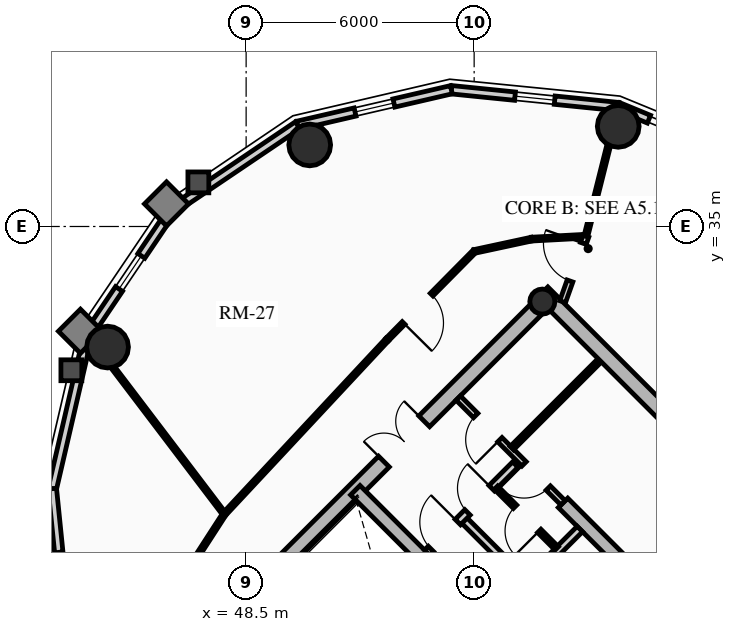
"""IFC4 building model, lengths in metres.
Left out: names, types, materials, properties, quantities, classifications, styles, units other than length and angle.
Written with IfcOpenShell. Run it as: python <this file> out.ifc"""

import sys

from ifc_helpers import new_model, si_unit, direction, frame, frame_2d, origin, origin_2d, place, context, subcontext, project, spatial, rectangle, circle, hollow_circle, extrude, source, transform, mapped, element, fill, save


model = new_model("IFC4")
c1 = context("Model", 3, precision=1e-05, world=origin(), true_north=direction((0.0, 1.0)))
c2 = subcontext(c1, "Body", "Model", "MODEL_VIEW")
j1 = project(units=[si_unit("LENGTHUNIT", "METRE"), si_unit("PLANEANGLEUNIT", "RADIAN")], contexts=[c1])
p1 = place(None, origin())
s1 = spatial("IfcSite", under=j1, at=p1, CompositionType="ELEMENT")
p2 = place(p1, origin())
s2 = spatial("IfcBuilding", under=s1, at=p2, CompositionType="ELEMENT")
p3 = place(p2, frame((0.0, 0.0, 202.48)))
s3 = spatial("IfcBuildingStorey", under=s2, at=p3, CompositionType="ELEMENT", Elevation=202.48)
p4 = place(p3, frame((66.268, 23.298, 0.0), z_axis=(0.0, 0.0, 1.0), x_axis=(-0.707106781187, 0.707106781187, 0.0)))
e1 = element("IfcWall", 1, at=p4, inside=s3, PredefinedType="SHEAR", context=c2, shape_type="SweptSolid", body=[
    extrude(rectangle(XDim=14.1, YDim=0.4, at=frame_2d((7.05, 0.0))), origin(), (0.0, 0.0, 1.0), 2.91),
])
p5 = place(p3, frame((48.873, 25.561, 0.0), z_axis=(0.0, 0.0, 1.0), x_axis=(0.707106781187, 0.707106781187, 0.0)))
e2 = element("IfcWall", 2, at=p5, inside=s3, PredefinedType="SHEAR", context=c2, shape_type="SweptSolid", body=[
    extrude(rectangle(XDim=10.7, YDim=0.4, at=frame_2d((5.35, 0.0))), origin(), (0.0, 0.0, 1.0), 2.91),
])
m1 = source(origin(), c2, "Body", "SweptSolid", [
    extrude(rectangle(XDim=1.5, YDim=2.02, at=frame_2d((0.75, 1.01))), frame((0.0, 0.21, 0.0), z_axis=(0.0, -1.0, 0.0), x_axis=(1.0, 0.0, 0.0)), (0.0, 0.0, 1.0), 0.42),
])
p6 = place(p5, frame((4.6, 0.0, 0.0)))
e3 = element("IfcOpeningElement", 3, at=p6, cuts=e2, PredefinedType="OPENING", context=c2, shape_type="MappedRepresentation", body=[
    mapped(m1, transform((0.0, 0.0, 0.0), x_axis=(1.0, 0.0, 0.0), y_axis=(0.0, 1.0, 0.0), z_axis=(0.0, 0.0, 1.0), scale=1.0)),
])
p7 = place(p3, frame((61.06, 18.373, 0.0), z_axis=(0.0, 0.0, 1.0), x_axis=(-0.707106781187, 0.707106781187, 0.0)))
e4 = element("IfcWall", 4, at=p7, inside=s3, PredefinedType="SHEAR", context=c2, shape_type="SweptSolid", body=[
    extrude(rectangle(XDim=13.7, YDim=0.35, at=frame_2d((6.85, 0.0))), origin(), (0.0, 0.0, 1.0), 2.91),
])
m2 = source(origin(), c2, "Body", "SweptSolid", [
    extrude(rectangle(XDim=1.1, YDim=2.015, at=frame_2d((0.55, 1.007))), frame((0.0, 0.185, 0.0), z_axis=(0.0, -1.0, 0.0), x_axis=(1.0, 0.0, 0.0)), (0.0, 0.0, 1.0), 0.37),
])
p8 = place(p7, frame((4.85, 0.0, 0.0)))
e5 = element("IfcOpeningElement", 5, at=p8, cuts=e4, PredefinedType="OPENING", context=c2, shape_type="MappedRepresentation", body=[
    mapped(m2, transform((0.0, 0.0, 0.0), x_axis=(1.0, 0.0, 0.0), y_axis=(0.0, 1.0, 0.0), z_axis=(0.0, 0.0, 1.0), scale=1.0)),
])
p9 = place(p7, frame((0.625, 0.0, 0.0)))
e6 = element("IfcOpeningElement", 6, at=p9, cuts=e4, PredefinedType="OPENING", context=c2, shape_type="MappedRepresentation", body=[
    mapped(m2, transform((0.0, 0.0, 0.0), x_axis=(1.0, 0.0, 0.0), y_axis=(0.0, 1.0, 0.0), z_axis=(0.0, 0.0, 1.0), scale=1.0)),
])
p10 = place(p7, frame((2.625, 0.0, 0.0)))
e7 = element("IfcOpeningElement", 7, at=p10, cuts=e4, PredefinedType="OPENING", context=c2, shape_type="MappedRepresentation", body=[
    mapped(m2, transform((0.0, 0.0, 0.0), x_axis=(1.0, 0.0, 0.0), y_axis=(0.0, 1.0, 0.0), z_axis=(0.0, 0.0, 1.0), scale=1.0)),
])
m3 = source(origin(), c2, "Body", "SweptSolid", [
    extrude(rectangle(XDim=1.15, YDim=2.02, at=frame_2d((0.575, 1.01))), frame((0.0, 0.185, 0.0), z_axis=(0.0, -1.0, 0.0), x_axis=(1.0, 0.0, 0.0)), (0.0, 0.0, 1.0), 0.37),
])
p11 = place(p7, frame((7.27, 0.0, 0.0)))
e8 = element("IfcOpeningElement", 8, at=p11, cuts=e4, PredefinedType="OPENING", context=c2, shape_type="MappedRepresentation", body=[
    mapped(m3, transform((0.0, 0.0, 0.0), x_axis=(1.0, 0.0, 0.0), y_axis=(0.0, 1.0, 0.0), z_axis=(0.0, 0.0, 1.0), scale=1.0)),
])
p12 = place(p3, frame((63.627, 20.94, 0.0), z_axis=(0.0, 0.0, 1.0), x_axis=(-0.707119496762, 0.707094065383, 0.0)))
e9 = element("IfcWall", 9, at=p12, inside=s3, PredefinedType="SHEAR", context=c2, shape_type="SweptSolid", body=[
    extrude(rectangle(XDim=9.6, YDim=0.35, at=frame_2d((4.8, 0.0))), origin(), (0.0, 0.0, 1.0), 2.91),
])
p13 = place(p12, frame((5.28, 0.0, 0.0)))
e10 = element("IfcOpeningElement", 10, at=p13, cuts=e9, PredefinedType="OPENING", context=c2, shape_type="MappedRepresentation", body=[
    mapped(m3, transform((0.0, 0.0, 0.0), x_axis=(1.0, 0.0, 0.0), y_axis=(0.0, 1.0, 0.0), z_axis=(0.0, 0.0, 1.0), scale=1.0)),
])
p14 = place(p3, frame((58.893, 25.674, 0.0), z_axis=(0.0, 0.0, 1.0), x_axis=(0.707106781187, 0.707106781187, 0.0)))
e11 = element("IfcWall", 11, at=p14, inside=s3, PredefinedType="SHEAR", context=c2, shape_type="SweptSolid", body=[
    extrude(rectangle(XDim=3.285, YDim=0.35, at=frame_2d((1.643, 0.0))), origin(), (0.0, 0.0, 1.0), 2.91),
])
p15 = place(p3, frame((56.294, 33.024, 0.0), z_axis=(0.0, 0.0, 1.0), x_axis=(0.707106781187, 0.707106781187, 0.0)))
e12 = element("IfcColumn", 12, at=p15, inside=s3, PredefinedType="COLUMN", context=c2, shape_type="SweptSolid", body=[
    extrude(hollow_circle(Radius=0.33, WallThickness=0.025, at=origin_2d()), origin(), (0.0, 0.0, 1.0), 2.91),
])
for number, where, z_axis, x_axis in (
    (13, (58.291, 37.635, 0.0), (0.0, 0.0, 1.0), (1.0, 0.0, 0.0)),
    (14, (50.173, 37.146, 0.0), (0.0, 0.0, 1.0), (1.0, 0.0, 0.0)),
    (15, (44.854, 31.827, 0.0), (0.0, 0.0, 1.0), (1.0, 0.0, 0.0)),
):
    element("IfcColumn", number, at=place(p3, frame(where, z_axis=z_axis, x_axis=x_axis)), inside=s3, PredefinedType="USERDEFINED", context=c2, shape_type="SweptSolid", body=[
        extrude(circle(Radius=0.55, at=origin_2d()), origin(), (0.0, 0.0, 1.0), 2.91),
    ])
p16 = place(p3, frame((58.295, 38.155, 0.0), z_axis=(0.0, 0.0, 1.0), x_axis=(0.924515260676, -0.381145028536, 0.0)))
e16 = element("IfcWall", 16, at=p16, inside=s3, PredefinedType="SOLIDWALL", context=c2, shape_type="SweptSolid", body=[
    extrude(rectangle(XDim=0.87, YDim=0.22, at=frame_2d((0.435, 0.0))), origin(), (0.0, 0.0, 1.0), 2.322),
])
p17 = place(p3, frame((53.9, 38.599, 0.0), z_axis=(0.0, 0.0, 1.0), x_axis=(0.994929930991, -0.100570534541, 0.0)))
e17 = element("IfcWall", 17, at=p17, inside=s3, PredefinedType="SOLIDWALL", context=c2, shape_type="SweptSolid", body=[
    extrude(rectangle(XDim=4.418, YDim=0.22, at=frame_2d((2.209, 0.0))), origin(), (0.0, 0.0, 1.0), 2.322),
])
m4 = source(origin(), c2, "Body", "SweptSolid", [
    extrude(rectangle(XDim=1.05, YDim=1.3, at=frame_2d((0.525, 0.65))), frame((0.0, 0.12, 0.0), z_axis=(0.0, -1.0, 0.0), x_axis=(1.0, 0.0, 0.0)), (0.0, 0.0, 1.0), 0.24),
])
p18 = place(p17, frame((1.684, 0.0, 0.65)))
e18 = element("IfcOpeningElement", 18, at=p18, cuts=e17, PredefinedType="OPENING", context=c2, shape_type="MappedRepresentation", body=[
    mapped(m4, transform((0.0, 0.0, 0.0), x_axis=(1.0, 0.0, 0.0), y_axis=(0.0, 1.0, 0.0), z_axis=(0.0, 0.0, 1.0), scale=1.0)),
])
p19 = place(p3, frame((49.856, 37.663, 0.0), z_axis=(0.0, 0.0, 1.0), x_axis=(0.974249228678, 0.225473813158, 0.0)))
e19 = element("IfcWall", 19, at=p19, inside=s3, PredefinedType="SOLIDWALL", context=c2, shape_type="SweptSolid", body=[
    extrude(rectangle(XDim=4.15, YDim=0.22, at=frame_2d((2.075, 0.0))), origin(), (0.0, 0.0, 1.0), 2.322),
])
p20 = place(p19, frame((1.55, 0.0, 0.65)))
e20 = element("IfcOpeningElement", 20, at=p20, cuts=e19, PredefinedType="OPENING", context=c2, shape_type="MappedRepresentation", body=[
    mapped(m4, transform((0.0, 0.0, 0.0), x_axis=(1.0, 0.0, 0.0), y_axis=(0.0, 1.0, 0.0), z_axis=(0.0, 0.0, 1.0), scale=1.0)),
])
p21 = place(p3, frame((46.561, 35.439, 0.0), z_axis=(0.0, 0.0, 1.0), x_axis=(0.828833723692, 0.559495003079, 0.0)))
e21 = element("IfcWall", 21, at=p21, inside=s3, PredefinedType="SOLIDWALL", context=c2, shape_type="SweptSolid", body=[
    extrude(rectangle(XDim=3.976, YDim=0.22, at=frame_2d((1.988, 0.0))), origin(), (0.0, 0.0, 1.0), 2.322),
])
p22 = place(p3, frame((44.337, 32.144, 0.0), z_axis=(0.0, 0.0, 1.0), x_axis=(0.559495003079, 0.828833723692, 0.0)))
e22 = element("IfcWall", 22, at=p22, inside=s3, PredefinedType="SOLIDWALL", context=c2, shape_type="SweptSolid", body=[
    extrude(rectangle(XDim=3.976, YDim=0.22, at=frame_2d((1.988, 0.0))), origin(), (0.0, 0.0, 1.0), 2.322),
])
p23 = place(p22, frame((1.463, 0.0, 0.65)))
e23 = element("IfcOpeningElement", 23, at=p23, cuts=e22, PredefinedType="OPENING", context=c2, shape_type="MappedRepresentation", body=[
    mapped(m4, transform((0.0, 0.0, 0.0), x_axis=(1.0, 0.0, 0.0), y_axis=(0.0, 1.0, 0.0), z_axis=(0.0, 0.0, 1.0), scale=1.0)),
])
p24 = place(p3, frame((43.401, 28.1, 0.0), z_axis=(0.0, 0.0, 1.0), x_axis=(0.225473813158, 0.974249228678, 0.0)))
e24 = element("IfcWall", 24, at=p24, inside=s3, PredefinedType="SOLIDWALL", context=c2, shape_type="SweptSolid", body=[
    extrude(rectangle(XDim=4.15, YDim=0.22, at=frame_2d((2.075, 0.0))), origin(), (0.0, 0.0, 1.0), 2.322),
])
p25 = place(p3, frame((43.845, 23.705, 0.0), z_axis=(0.0, 0.0, 1.0), x_axis=(-0.100570534541, 0.994929930991, 0.0)))
e25 = element("IfcWall", 25, at=p25, inside=s3, PredefinedType="SOLIDWALL", context=c2, shape_type="SweptSolid", body=[
    extrude(rectangle(XDim=4.418, YDim=0.22, at=frame_2d((2.209, 0.0))), origin(), (0.0, 0.0, 1.0), 2.322),
])
p26 = place(p25, frame((1.684, 0.0, 0.65)))
e26 = element("IfcOpeningElement", 26, at=p26, cuts=e25, PredefinedType="OPENING", context=c2, shape_type="MappedRepresentation", body=[
    mapped(m4, transform((0.0, 0.0, 0.0), x_axis=(1.0, 0.0, 0.0), y_axis=(0.0, 1.0, 0.0), z_axis=(0.0, 0.0, 1.0), scale=1.0)),
])
p27 = place(p3, frame((54.961, 24.719, 0.0), z_axis=(0.0, 0.0, 1.0), x_axis=(0.707106781187, 0.707106781187, 0.0)))
e27 = element("IfcWall", 27, at=p27, inside=s3, PredefinedType="PARTITIONING", context=c2, shape_type="SweptSolid", body=[
    extrude(rectangle(XDim=3.28, YDim=0.2, at=frame_2d((1.64, 0.0))), origin(), (0.0, 0.0, 1.0), 2.685),
])
m5 = source(origin(), c2, "Body", "SweptSolid", [
    extrude(rectangle(XDim=0.9, YDim=2.005, at=frame_2d((0.45, 1.002))), frame((0.0, 0.11, 0.0), z_axis=(0.0, -1.0, 0.0), x_axis=(1.0, 0.0, 0.0)), (0.0, 0.0, 1.0), 0.22),
])
p28 = place(p27, frame((0.16, 0.0, 0.0)))
e28 = element("IfcOpeningElement", 28, at=p28, cuts=e27, PredefinedType="OPENING", context=c2, shape_type="MappedRepresentation", body=[
    mapped(m5, transform((0.0, 0.0, 0.0), x_axis=(1.0, 0.0, 0.0), y_axis=(0.0, 1.0, 0.0), z_axis=(0.0, 0.0, 1.0), scale=1.0)),
])
p29 = place(p3, frame((55.874, 25.631, 0.0), z_axis=(0.0, 0.0, 1.0), x_axis=(-0.707157639372, 0.707055919343, 0.0)))
e29 = element("IfcWall", 29, at=p29, inside=s3, PredefinedType="PARTITIONING", context=c2, shape_type="SweptSolid", body=[
    extrude(rectangle(XDim=2.4, YDim=0.2, at=frame_2d((1.2, 0.0))), origin(), (0.0, 0.0, 1.0), 2.685),
])
p30 = place(p3, frame((53.264, 26.416, 0.0), z_axis=(0.0, 0.0, 1.0), x_axis=(0.707106781187, 0.707106781187, 0.0)))
e30 = element("IfcWall", 30, at=p30, inside=s3, PredefinedType="PARTITIONING", context=c2, shape_type="SweptSolid", body=[
    extrude(rectangle(XDim=3.28, YDim=0.2, at=frame_2d((1.64, 0.0))), origin(), (0.0, 0.0, 1.0), 2.685),
])
m6 = source(origin(), c2, "Body", "SweptSolid", [
    extrude(rectangle(XDim=1.0, YDim=2.015, at=frame_2d((0.5, 1.007))), frame((0.0, 0.11, 0.0), z_axis=(0.0, -1.0, 0.0), x_axis=(1.0, 0.0, 0.0)), (0.0, 0.0, 1.0), 0.22),
])
p31 = place(p30, frame((0.14, 0.0, 0.0)))
e31 = element("IfcOpeningElement", 31, at=p31, cuts=e30, PredefinedType="OPENING", context=c2, shape_type="MappedRepresentation", body=[
    mapped(m6, transform((0.0, 0.0, 0.0), x_axis=(1.0, 0.0, 0.0), y_axis=(0.0, 1.0, 0.0), z_axis=(0.0, 0.0, 1.0), scale=1.0)),
])
p32 = place(p30, frame((1.5, 0.0, 0.0)))
e32 = element("IfcOpeningElement", 32, at=p32, cuts=e30, PredefinedType="OPENING", context=c2, shape_type="MappedRepresentation", body=[
    mapped(m5, transform((0.0, 0.0, 0.0), x_axis=(1.0, 0.0, 0.0), y_axis=(0.0, 1.0, 0.0), z_axis=(0.0, 0.0, 1.0), scale=1.0)),
])
p33 = place(p3, frame((56.673, 26.529, 0.0), z_axis=(0.0, 0.0, 1.0), x_axis=(-0.707052764397, 0.70716079385, 0.0)))
e33 = element("IfcWall", 33, at=p33, inside=s3, PredefinedType="PARTITIONING", context=c2, shape_type="SweptSolid", body=[
    extrude(rectangle(XDim=2.26, YDim=0.125, at=frame_2d((1.13, 0.0))), origin(), (0.0, 0.0, 1.0), 2.685),
])
m7 = source(origin(), c2, "Body", "SweptSolid", [
    extrude(rectangle(XDim=0.9, YDim=2.005, at=frame_2d((0.45, 1.002))), frame((0.0, 0.073, 0.0), z_axis=(0.0, -1.0, 0.0), x_axis=(1.0, 0.0, 0.0)), (0.0, 0.0, 1.0), 0.145),
])
p34 = place(p33, frame((0.65, 0.0, 0.0)))
e34 = element("IfcOpeningElement", 34, at=p34, cuts=e33, PredefinedType="OPENING", context=c2, shape_type="MappedRepresentation", body=[
    mapped(m7, transform((0.0, 0.0, 0.0), x_axis=(1.0, 0.0, 0.0), y_axis=(0.0, 1.0, 0.0), z_axis=(0.0, 0.0, 1.0), scale=1.0)),
])
p35 = place(p3, frame((56.839, 27.728, 0.0), z_axis=(0.0, 0.0, 1.0), x_axis=(-0.707106781187, 0.707106781187, 0.0)))
e35 = element("IfcWall", 35, at=p35, inside=s3, PredefinedType="PARTITIONING", context=c2, shape_type="SweptSolid", body=[
    extrude(rectangle(XDim=3.9, YDim=0.16, at=frame_2d((1.95, 0.0))), origin(), (0.0, 0.0, 1.0), 2.685),
])
m8 = source(origin(), c2, "Body", "SweptSolid", [
    extrude(rectangle(XDim=0.9, YDim=2.005, at=frame_2d((0.45, 1.002))), frame((0.0, 0.09, 0.0), z_axis=(0.0, -1.0, 0.0), x_axis=(1.0, 0.0, 0.0)), (0.0, 0.0, 1.0), 0.18),
])
p36 = place(p35, frame((0.55, 0.0, 0.0)))
e36 = element("IfcOpeningElement", 36, at=p36, cuts=e35, PredefinedType="OPENING", context=c2, shape_type="MappedRepresentation", body=[
    mapped(m8, transform((0.0, 0.0, 0.0), x_axis=(1.0, 0.0, 0.0), y_axis=(0.0, 1.0, 0.0), z_axis=(0.0, 0.0, 1.0), scale=1.0)),
])
p37 = place(p35, frame((2.35, 0.0, 0.0)))
e37 = element("IfcOpeningElement", 37, at=p37, cuts=e35, PredefinedType="OPENING", context=c2, shape_type="MappedRepresentation", body=[
    mapped(m8, transform((0.0, 0.0, 0.0), x_axis=(1.0, 0.0, 0.0), y_axis=(0.0, 1.0, 0.0), z_axis=(0.0, 0.0, 1.0), scale=1.0)),
])
p38 = place(p3, frame((55.492, 29.167, 0.0), z_axis=(0.0, 0.0, 1.0), x_axis=(0.707144688645, 0.707068871696, 0.0)))
e38 = element("IfcWall", 38, at=p38, inside=s3, PredefinedType="PARTITIONING", context=c2, shape_type="SweptSolid", body=[
    extrude(rectangle(XDim=3.22, YDim=0.125, at=frame_2d((1.61, 0.0))), origin(), (0.0, 0.0, 1.0), 2.222),
])
p39 = place(p3, frame((57.44, 34.744, 0.0), z_axis=(0.0, 0.0, 1.0), x_axis=(-0.998578025565, -0.053309725738, 0.0)))
e39 = element("IfcWall", 39, at=p39, inside=s3, PredefinedType="MOVABLE", context=c2, shape_type="SweptSolid", body=[
    extrude(rectangle(XDim=1.433, YDim=0.1, at=frame_2d((0.717, 0.0))), origin(), (0.0, 0.0, 1.0), 2.322),
])
p40 = place(p3, frame((56.009, 34.667, 0.0), z_axis=(0.0, 0.0, 1.0), x_axis=(-0.977625498152, -0.210353001795, 0.0)))
e40 = element("IfcWall", 40, at=p40, inside=s3, PredefinedType="MOVABLE", context=c2, shape_type="SweptSolid", body=[
    extrude(rectangle(XDim=1.538, YDim=0.1, at=frame_2d((0.769, 0.0))), origin(), (0.0, 0.0, 1.0), 2.255),
])
p41 = place(p3, frame((54.506, 34.344, 0.0), z_axis=(0.0, 0.0, 1.0), x_axis=(-0.703053402247, -0.711137056824, 0.0)))
e41 = element("IfcWall", 41, at=p41, inside=s3, PredefinedType="MOVABLE", context=c2, shape_type="SweptSolid", body=[
    extrude(rectangle(XDim=3.262, YDim=0.1, at=frame_2d((1.631, 0.0))), origin(), (0.0, 0.0, 1.0), 2.322),
])
m9 = source(origin(), c2, "Body", "SweptSolid", [
    extrude(rectangle(XDim=1.05, YDim=2.015, at=frame_2d((0.525, 1.007))), frame((0.0, 0.06, 0.0), z_axis=(0.0, -1.0, 0.0), x_axis=(1.0, 0.0, 0.0)), (0.0, 0.0, 1.0), 0.12),
])
p42 = place(p41, frame((1.599, 0.0, 0.0)))
e42 = element("IfcOpeningElement", 42, at=p42, cuts=e41, PredefinedType="OPENING", context=c2, shape_type="MappedRepresentation", body=[
    mapped(m9, transform((0.0, 0.0, 0.0), x_axis=(1.0, 0.0, 0.0), y_axis=(0.0, 1.0, 0.0), z_axis=(0.0, 0.0, 1.0), scale=1.0)),
])
p43 = place(p3, frame((52.212, 32.024, 0.0), z_axis=(0.0, 0.0, 1.0), x_axis=(-0.682158998173, -0.731203871169, 0.0)))
e43 = element("IfcWall", 43, at=p43, inside=s3, PredefinedType="MOVABLE", context=c2, shape_type="SweptSolid", body=[
    extrude(rectangle(XDim=6.282, YDim=0.1, at=frame_2d((3.141, 0.0))), origin(), (0.0, 0.0, 1.0), 2.255),
])
p44 = place(p3, frame((47.927, 27.431, 0.0), z_axis=(0.0, 0.0, 1.0), x_axis=(-0.543126643356, -0.839650790077, 0.0)))
e44 = element("IfcWall", 44, at=p44, inside=s3, PredefinedType="MOVABLE", context=c2, shape_type="SweptSolid", body=[
    extrude(rectangle(XDim=1.868, YDim=0.1, at=frame_2d((0.934, 0.0))), origin(), (0.0, 0.0, 1.0), 2.255),
])
p45 = place(p3, frame((57.44, 34.744, 0.0), z_axis=(0.0, 0.0, 1.0), x_axis=(0.243619816457, 0.969870808422, 0.0)))
e45 = element("IfcWall", 45, at=p45, inside=s3, PredefinedType="MOVABLE", context=c2, shape_type="SweptSolid", body=[
    extrude(rectangle(XDim=3.496, YDim=0.1, at=frame_2d((1.748, 0.0))), origin(), (0.0, 0.0, 1.0), 2.322),
])
p46 = place(p3, frame((47.927, 27.431, 0.0), z_axis=(0.0, 0.0, 1.0), x_axis=(-0.604823333103, 0.796359677366, 0.0)))
e46 = element("IfcWall", 46, at=p46, inside=s3, PredefinedType="MOVABLE", context=c2, shape_type="SweptSolid", body=[
    extrude(rectangle(XDim=5.907, YDim=0.1, at=frame_2d((2.953, 0.0))), origin(), (0.0, 0.0, 1.0), 2.322),
])
p47 = place(p3, frame((56.828, 33.021, 0.0), z_axis=(0.0, 0.0, 1.0), x_axis=(0.334788446034, 0.942293317605, 0.0)))
e47 = element("IfcWall", 47, at=p47, inside=s3, PredefinedType="PARTITIONING", context=c2, shape_type="SweptSolid", body=[
    extrude(rectangle(XDim=1.829, YDim=0.16, at=frame_2d((0.915, 0.0))), origin(), (0.0, 0.0, 1.0), 2.255),
])
m10 = source(origin(), c2, "Body", "SweptSolid", [
    extrude(rectangle(XDim=1.05, YDim=2.015, at=frame_2d((0.525, 1.007))), frame((0.0, 0.09, 0.0), z_axis=(0.0, -1.0, 0.0), x_axis=(1.0, 0.0, 0.0)), (0.0, 0.0, 1.0), 0.18),
])
p48 = place(p47, frame((0.579, 0.0, 0.0)))
e48 = element("IfcOpeningElement", 48, at=p48, cuts=e47, PredefinedType="OPENING", context=c2, shape_type="MappedRepresentation", body=[
    mapped(m10, transform((0.0, 0.0, 0.0), x_axis=(1.0, 0.0, 0.0), y_axis=(0.0, 1.0, 0.0), z_axis=(0.0, 0.0, 1.0), scale=1.0)),
])
m11 = source(origin(), c2, "Body", "SweptSolid", [
    extrude(rectangle(XDim=1.05, YDim=1.3, at=frame_2d((0.525, 0.65))), frame((0.0, 0.03, 0.0), z_axis=(0.0, -1.0, 0.0), x_axis=(1.0, 0.0, 0.0)), (0.0, 0.0, 1.0), 0.06),
])
p49 = place(p18, origin())
e49 = element("IfcWindow", 49, at=p49, inside=s3, PartitioningType="SINGLE_PANEL", PredefinedType="WINDOW", context=c2, shape_type="MappedRepresentation", body=[
    mapped(m11, transform((0.0, 0.0, 0.0), x_axis=(1.0, 0.0, 0.0), y_axis=(0.0, 1.0, 0.0), z_axis=(0.0, 0.0, 1.0), scale=1.0)),
])
fill(e18, e49)
p50 = place(p20, origin())
e50 = element("IfcWindow", 50, at=p50, inside=s3, PartitioningType="SINGLE_PANEL", PredefinedType="WINDOW", context=c2, shape_type="MappedRepresentation", body=[
    mapped(m11, transform((0.0, 0.0, 0.0), x_axis=(1.0, 0.0, 0.0), y_axis=(0.0, 1.0, 0.0), z_axis=(0.0, 0.0, 1.0), scale=1.0)),
])
fill(e20, e50)
p51 = place(p23, origin())
e51 = element("IfcWindow", 51, at=p51, inside=s3, PartitioningType="SINGLE_PANEL", PredefinedType="WINDOW", context=c2, shape_type="MappedRepresentation", body=[
    mapped(m11, transform((0.0, 0.0, 0.0), x_axis=(1.0, 0.0, 0.0), y_axis=(0.0, 1.0, 0.0), z_axis=(0.0, 0.0, 1.0), scale=1.0)),
])
fill(e23, e51)
m12 = source(origin(), c2, "Body", "SweptSolid", [
    extrude(rectangle(XDim=1.5, YDim=2.02, at=frame_2d((0.75, 1.01))), frame((0.0, 0.025, 0.0), z_axis=(0.0, -1.0, 0.0), x_axis=(1.0, 0.0, 0.0)), (0.0, 0.0, 1.0), 0.05),
])
p52 = place(p6, origin())
e52 = element("IfcDoor", 52, at=p52, inside=s3, OperationType="DOUBLE_DOOR_SINGLE_SWING", PredefinedType="DOOR", context=c2, shape_type="MappedRepresentation", body=[
    mapped(m12, transform((0.0, 0.0, 0.0), x_axis=(1.0, 0.0, 0.0), y_axis=(0.0, 1.0, 0.0), z_axis=(0.0, 0.0, 1.0), scale=1.0)),
])
fill(e3, e52)
m13 = source(origin(), c2, "Body", "SweptSolid", [
    extrude(rectangle(XDim=1.0, YDim=2.015, at=frame_2d((0.5, 1.007))), frame((0.0, 0.025, 0.0), z_axis=(0.0, -1.0, 0.0), x_axis=(1.0, 0.0, 0.0)), (0.0, 0.0, 1.0), 0.05),
])
p53 = place(p31, origin())
e53 = element("IfcDoor", 53, at=p53, inside=s3, OperationType="SINGLE_SWING_RIGHT", PredefinedType="DOOR", context=c2, shape_type="MappedRepresentation", body=[
    mapped(m13, transform((0.0, 0.0, 0.0), x_axis=(1.0, 0.0, 0.0), y_axis=(0.0, 1.0, 0.0), z_axis=(0.0, 0.0, 1.0), scale=1.0)),
])
fill(e31, e53)
m14 = source(origin(), c2, "Body", "SweptSolid", [
    extrude(rectangle(XDim=0.9, YDim=2.005, at=frame_2d((0.45, 1.002))), frame((0.0, 0.025, 0.0), z_axis=(0.0, -1.0, 0.0), x_axis=(1.0, 0.0, 0.0)), (0.0, 0.0, 1.0), 0.05),
])
p54 = place(p32, origin())
e54 = element("IfcDoor", 54, at=p54, inside=s3, OperationType="SINGLE_SWING_RIGHT", PredefinedType="DOOR", context=c2, shape_type="MappedRepresentation", body=[
    mapped(m14, transform((0.0, 0.0, 0.0), x_axis=(1.0, 0.0, 0.0), y_axis=(0.0, 1.0, 0.0), z_axis=(0.0, 0.0, 1.0), scale=1.0)),
])
fill(e32, e54)
p55 = place(p34, origin())
e55 = element("IfcDoor", 55, at=p55, inside=s3, OperationType="SINGLE_SWING_LEFT", PredefinedType="DOOR", context=c2, shape_type="MappedRepresentation", body=[
    mapped(m14, transform((0.0, 0.0, 0.0), x_axis=(1.0, 0.0, 0.0), y_axis=(0.0, 1.0, 0.0), z_axis=(0.0, 0.0, 1.0), scale=1.0)),
])
fill(e34, e55)
p56 = place(p36, origin())
e56 = element("IfcDoor", 56, at=p56, inside=s3, OperationType="SINGLE_SWING_RIGHT", PredefinedType="DOOR", context=c2, shape_type="MappedRepresentation", body=[
    mapped(m14, transform((0.0, 0.0, 0.0), x_axis=(1.0, 0.0, 0.0), y_axis=(0.0, 1.0, 0.0), z_axis=(0.0, 0.0, 1.0), scale=1.0)),
])
fill(e36, e56)
p57 = place(p37, origin())
e57 = element("IfcDoor", 57, at=p57, inside=s3, OperationType="SINGLE_SWING_LEFT", PredefinedType="DOOR", context=c2, shape_type="MappedRepresentation", body=[
    mapped(m14, transform((0.0, 0.0, 0.0), x_axis=(1.0, 0.0, 0.0), y_axis=(0.0, 1.0, 0.0), z_axis=(0.0, 0.0, 1.0), scale=1.0)),
])
fill(e37, e57)
m15 = source(origin(), c2, "Body", "SweptSolid", [
    extrude(rectangle(XDim=1.05, YDim=2.015, at=frame_2d((0.525, 1.007))), frame((0.0, 0.025, 0.0), z_axis=(0.0, -1.0, 0.0), x_axis=(1.0, 0.0, 0.0)), (0.0, 0.0, 1.0), 0.05),
])
p58 = place(p48, origin())
e58 = element("IfcDoor", 58, at=p58, inside=s3, OperationType="SINGLE_SWING_RIGHT", PredefinedType="DOOR", context=c2, shape_type="MappedRepresentation", body=[
    mapped(m15, transform((0.0, 0.0, 0.0), x_axis=(1.0, 0.0, 0.0), y_axis=(0.0, 1.0, 0.0), z_axis=(0.0, 0.0, 1.0), scale=1.0)),
])
fill(e48, e58)
p59 = place(p42, origin())
e59 = element("IfcDoor", 59, at=p59, inside=s3, OperationType="SINGLE_SWING_RIGHT", PredefinedType="DOOR", context=c2, shape_type="MappedRepresentation", body=[
    mapped(m15, transform((0.0, 0.0, 0.0), x_axis=(1.0, 0.0, 0.0), y_axis=(0.0, 1.0, 0.0), z_axis=(0.0, 0.0, 1.0), scale=1.0)),
])
fill(e42, e59)
save(model, sys.argv[1])
